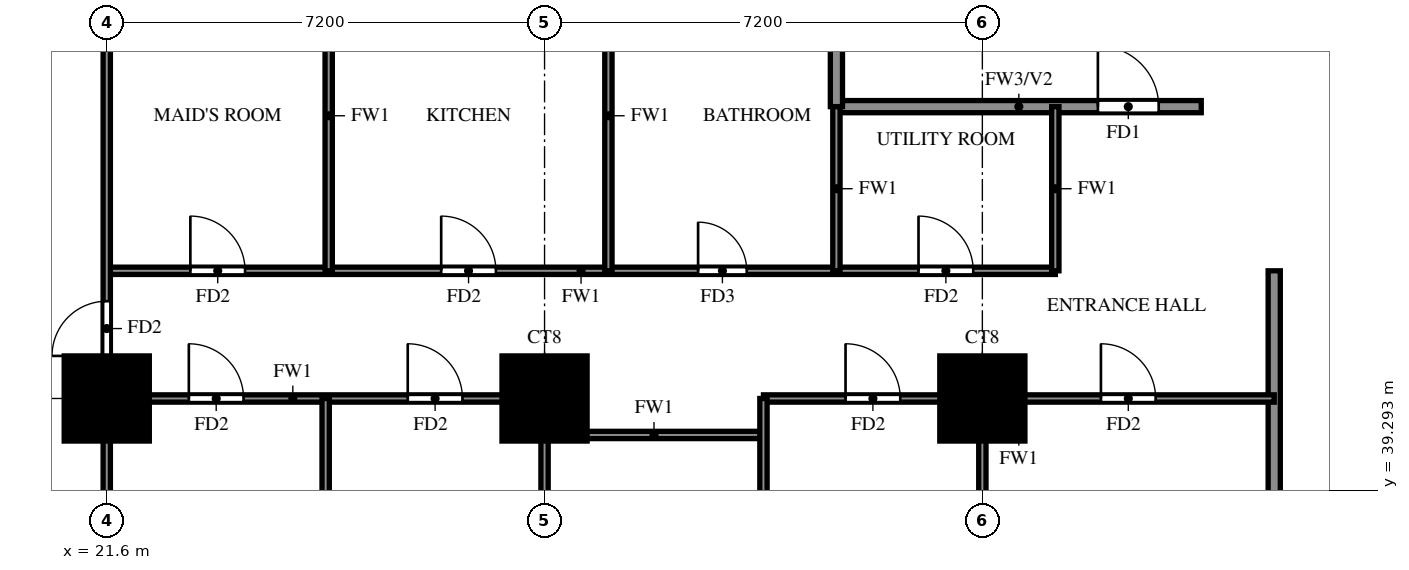
"""IFC4 building model, lengths in metres.
Left out: names, types, materials, properties, quantities, classifications, styles, units other than length and angle.
Written with IfcOpenShell. Run it as: python <this file> out.ifc"""

import sys

from ifc_helpers import new_model, si_unit, direction, frame, frame_2d, origin, origin_2d, place, context, subcontext, project, spatial, rectangle, extrude, source, transform, mapped, element, fill, save


model = new_model("IFC4")
c1 = context("Model", 3, precision=1e-05, world=origin(), true_north=direction((0.0, 1.0)))
c2 = subcontext(c1, "Body", "Model", "MODEL_VIEW")
j1 = project(units=[si_unit("LENGTHUNIT", "METRE"), si_unit("PLANEANGLEUNIT", "RADIAN")], contexts=[c1])
p1 = place(None, origin())
s1 = spatial("IfcSite", under=j1, at=p1, CompositionType="ELEMENT")
p2 = place(p1, origin())
s2 = spatial("IfcBuilding", under=s1, at=p2, CompositionType="ELEMENT")
p3 = place(p2, frame((0.0, 0.0, 34.0)))
s3 = spatial("IfcBuildingStorey", under=s2, at=p3, CompositionType="ELEMENT", Elevation=34.0)
m1 = source(origin(), c2, "Body", "SweptSolid", [
    extrude(rectangle(XDim=1.4, YDim=1.4, at=origin_2d()), origin(), (0.0, 0.0, 1.0), 3.18),
])
for number, where, z_axis, x_axis in (
    (1, (21.6, 40.8, 0.0), (0.0, 0.0, 1.0), (1.0, 0.0, 0.0)),
    (2, (28.8, 40.8, 0.0), (0.0, 0.0, 1.0), (1.0, 0.0, 0.0)),
    (3, (36.0, 40.8, 0.0), (0.0, 0.0, 1.0), (1.0, 0.0, 0.0)),
):
    element("IfcColumn", number, at=place(p3, frame(where, z_axis=z_axis, x_axis=x_axis)), inside=s3, PredefinedType="COLUMN", context=c2, shape_type="MappedRepresentation", body=[
        mapped(m1, transform((0.0, 0.0, 0.0))),
    ])
p4 = place(p3, frame((33.6, 45.6, 0.0), z_axis=(0.0, 0.0, 1.0), x_axis=(1.0, 0.0, 0.0)))
e4 = element("IfcWall", 4, at=p4, inside=s3, PredefinedType="SOLIDWALL", context=c2, shape_type="SweptSolid", body=[
    extrude(rectangle(XDim=6.0, YDim=0.2, at=frame_2d((3.0, 0.0))), origin(), (0.0, 0.0, 1.0), 3.18),
])
p5 = place(p4, frame((4.3, 0.0, 0.0)))
e5 = element("IfcOpeningElement", 5, at=p5, cuts=e4, PredefinedType="OPENING", context=c2, shape_type="SweptSolid", body=[
    extrude(rectangle(XDim=1.0, YDim=2.1, at=frame_2d((0.5, 1.05))), frame((0.0, 0.11, 0.0), z_axis=(0.0, -1.0, 0.0), x_axis=(1.0, 0.0, 0.0)), (0.0, 0.0, 1.0), 0.22),
])
p6 = place(p3, frame((33.6, 45.6, 0.0), z_axis=(0.0, 0.0, 1.0), x_axis=(0.0, 1.0, 0.0)))
e6 = element("IfcWall", 6, at=p6, inside=s3, PredefinedType="SOLIDWALL", context=c2, shape_type="SweptSolid", body=[
    extrude(rectangle(XDim=14.4, YDim=0.2, at=frame_2d((7.2, 0.0))), origin(), (0.0, 0.0, 1.0), 3.18),
])
p7 = place(p3, frame((40.8, 33.725, 0.0), z_axis=(0.0, 0.0, 1.0), x_axis=(0.0, 1.0, 0.0)))
e7 = element("IfcWall", 7, at=p7, inside=s3, PredefinedType="SOLIDWALL", context=c2, shape_type="SweptSolid", body=[
    extrude(rectangle(XDim=9.175, YDim=0.2, at=frame_2d((4.587, 0.0))), origin(), (0.0, 0.0, 1.0), 2.28),
])
p8 = place(p3, frame((28.8, 40.2, 0.0), z_axis=(0.0, 0.0, 1.0), x_axis=(1.0, 0.0, 0.0)))
e8 = element("IfcWall", 8, at=p8, inside=s3, PredefinedType="PARTITIONING", context=c2, shape_type="SweptSolid", body=[
    extrude(rectangle(XDim=3.6, YDim=0.12, at=frame_2d((1.8, 0.0))), origin(), (0.0, 0.0, 1.0), 3.18),
])
p9 = place(p3, frame((21.6, 40.8, 0.0), z_axis=(0.0, 0.0, 1.0), x_axis=(1.0, 0.0, 0.0)))
e9 = element("IfcWall", 9, at=p9, inside=s3, PredefinedType="PARTITIONING", context=c2, shape_type="SweptSolid", body=[
    extrude(rectangle(XDim=7.2, YDim=0.12, at=frame_2d((3.6, 0.0))), origin(), (0.0, 0.0, 1.0), 3.18),
])
p10 = place(p9, frame((1.35, 0.0, 0.0)))
e10 = element("IfcOpeningElement", 10, at=p10, cuts=e9, PredefinedType="OPENING", context=c2, shape_type="SweptSolid", body=[
    extrude(rectangle(XDim=0.9, YDim=2.1, at=frame_2d((0.45, 1.05))), frame((0.0, 0.07, 0.0), z_axis=(0.0, -1.0, 0.0), x_axis=(1.0, 0.0, 0.0)), (0.0, 0.0, 1.0), 0.14),
])
p11 = place(p9, frame((4.95, 0.0, 0.0)))
e11 = element("IfcOpeningElement", 11, at=p11, cuts=e9, PredefinedType="OPENING", context=c2, shape_type="SweptSolid", body=[
    extrude(rectangle(XDim=0.9, YDim=2.1, at=frame_2d((0.45, 1.05))), frame((0.0, 0.07, 0.0), z_axis=(0.0, -1.0, 0.0), x_axis=(1.0, 0.0, 0.0)), (0.0, 0.0, 1.0), 0.14),
])
p12 = place(p3, frame((32.4, 40.8, 0.0), z_axis=(0.0, 0.0, 1.0), x_axis=(1.0, 0.0, 0.0)))
e12 = element("IfcWall", 12, at=p12, inside=s3, PredefinedType="PARTITIONING", context=c2, shape_type="SweptSolid", body=[
    extrude(rectangle(XDim=8.4, YDim=0.12, at=frame_2d((4.2, 0.0))), origin(), (0.0, 0.0, 1.0), 3.18),
])
p13 = place(p12, frame((1.35, 0.0, 0.0)))
e13 = element("IfcOpeningElement", 13, at=p13, cuts=e12, PredefinedType="OPENING", context=c2, shape_type="SweptSolid", body=[
    extrude(rectangle(XDim=0.9, YDim=2.1, at=frame_2d((0.45, 1.05))), frame((0.0, 0.07, 0.0), z_axis=(0.0, -1.0, 0.0), x_axis=(1.0, 0.0, 0.0)), (0.0, 0.0, 1.0), 0.14),
])
p14 = place(p12, frame((5.55, 0.0, 0.0)))
e14 = element("IfcOpeningElement", 14, at=p14, cuts=e12, PredefinedType="OPENING", context=c2, shape_type="SweptSolid", body=[
    extrude(rectangle(XDim=0.9, YDim=2.1, at=frame_2d((0.45, 1.05))), frame((0.0, 0.07, 0.0), z_axis=(0.0, -1.0, 0.0), x_axis=(1.0, 0.0, 0.0)), (0.0, 0.0, 1.0), 0.14),
])
p15 = place(p3, frame((21.6, 42.9, 0.0), z_axis=(0.0, 0.0, 1.0), x_axis=(1.0, 0.0, 0.0)))
e15 = element("IfcWall", 15, at=p15, inside=s3, PredefinedType="PARTITIONING", context=c2, shape_type="SweptSolid", body=[
    extrude(rectangle(XDim=15.6, YDim=0.12, at=frame_2d((7.8, 0.0))), origin(), (0.0, 0.0, 1.0), 3.18),
])
p16 = place(p15, frame((1.375, 0.0, 0.0)))
e16 = element("IfcOpeningElement", 16, at=p16, cuts=e15, PredefinedType="OPENING", context=c2, shape_type="SweptSolid", body=[
    extrude(rectangle(XDim=0.9, YDim=2.1, at=frame_2d((0.45, 1.05))), frame((0.0, 0.07, 0.0), z_axis=(0.0, -1.0, 0.0), x_axis=(1.0, 0.0, 0.0)), (0.0, 0.0, 1.0), 0.14),
])
p17 = place(p15, frame((5.5, 0.0, 0.0)))
e17 = element("IfcOpeningElement", 17, at=p17, cuts=e15, PredefinedType="OPENING", context=c2, shape_type="SweptSolid", body=[
    extrude(rectangle(XDim=0.9, YDim=2.1, at=frame_2d((0.45, 1.05))), frame((0.0, 0.07, 0.0), z_axis=(0.0, -1.0, 0.0), x_axis=(1.0, 0.0, 0.0)), (0.0, 0.0, 1.0), 0.14),
])
p18 = place(p15, frame((9.725, 0.0, 0.0)))
e18 = element("IfcOpeningElement", 18, at=p18, cuts=e15, PredefinedType="OPENING", context=c2, shape_type="SweptSolid", body=[
    extrude(rectangle(XDim=0.8, YDim=2.1, at=frame_2d((0.4, 1.05))), frame((0.0, 0.07, 0.0), z_axis=(0.0, -1.0, 0.0), x_axis=(1.0, 0.0, 0.0)), (0.0, 0.0, 1.0), 0.14),
])
p19 = place(p15, frame((13.35, 0.0, 0.0)))
e19 = element("IfcOpeningElement", 19, at=p19, cuts=e15, PredefinedType="OPENING", context=c2, shape_type="SweptSolid", body=[
    extrude(rectangle(XDim=0.9, YDim=2.1, at=frame_2d((0.45, 1.05))), frame((0.0, 0.07, 0.0), z_axis=(0.0, -1.0, 0.0), x_axis=(1.0, 0.0, 0.0)), (0.0, 0.0, 1.0), 0.14),
])
p20 = place(p3, frame((21.6, 33.725, 0.0), z_axis=(0.0, 0.0, 1.0), x_axis=(0.0, 1.0, 0.0)))
e20 = element("IfcWall", 20, at=p20, inside=s3, PredefinedType="PARTITIONING", context=c2, shape_type="SweptSolid", body=[
    extrude(rectangle(XDim=35.875, YDim=0.12, at=frame_2d((17.938, 0.0))), origin(), (0.0, 0.0, 1.0), 3.18),
])
p21 = place(p20, frame((7.775, 0.0, 0.0)))
e21 = element("IfcOpeningElement", 21, at=p21, cuts=e20, PredefinedType="OPENING", context=c2, shape_type="SweptSolid", body=[
    extrude(rectangle(XDim=0.9, YDim=2.1, at=frame_2d((0.45, 1.05))), frame((0.0, 0.07, 0.0), z_axis=(0.0, -1.0, 0.0), x_axis=(1.0, 0.0, 0.0)), (0.0, 0.0, 1.0), 0.14),
])
p22 = place(p20, frame((15.625, 0.0, 0.0)))
e22 = element("IfcOpeningElement", 22, at=p22, cuts=e20, PredefinedType="OPENING", context=c2, shape_type="SweptSolid", body=[
    extrude(rectangle(XDim=0.9, YDim=2.1, at=frame_2d((0.45, 1.05))), frame((0.0, 0.07, 0.0), z_axis=(0.0, -1.0, 0.0), x_axis=(1.0, 0.0, 0.0)), (0.0, 0.0, 1.0), 0.14),
])
p23 = place(p20, frame((22.225, 0.0, 0.0)))
e23 = element("IfcOpeningElement", 23, at=p23, cuts=e20, PredefinedType="OPENING", context=c2, shape_type="SweptSolid", body=[
    extrude(rectangle(XDim=1.5, YDim=2.1, at=frame_2d((0.75, 1.05))), frame((0.0, 0.07, 0.0), z_axis=(0.0, -1.0, 0.0), x_axis=(1.0, 0.0, 0.0)), (0.0, 0.0, 1.0), 0.14),
])
p24 = place(p20, frame((26.425, 0.0, 0.0)))
e24 = element("IfcOpeningElement", 24, at=p24, cuts=e20, PredefinedType="OPENING", context=c2, shape_type="SweptSolid", body=[
    extrude(rectangle(XDim=0.9, YDim=2.1, at=frame_2d((0.45, 1.05))), frame((0.0, 0.07, 0.0), z_axis=(0.0, -1.0, 0.0), x_axis=(1.0, 0.0, 0.0)), (0.0, 0.0, 1.0), 0.14),
])
p25 = place(p20, frame((30.025, 0.0, 0.0)))
e25 = element("IfcOpeningElement", 25, at=p25, cuts=e20, PredefinedType="OPENING", context=c2, shape_type="SweptSolid", body=[
    extrude(rectangle(XDim=0.9, YDim=2.1, at=frame_2d((0.45, 1.05))), frame((0.0, 0.07, 0.0), z_axis=(0.0, -1.0, 0.0), x_axis=(1.0, 0.0, 0.0)), (0.0, 0.0, 1.0), 0.14),
])
p26 = place(p20, frame((33.625, 0.0, 0.0)))
e26 = element("IfcOpeningElement", 26, at=p26, cuts=e20, PredefinedType="OPENING", context=c2, shape_type="SweptSolid", body=[
    extrude(rectangle(XDim=0.9, YDim=2.1, at=frame_2d((0.45, 1.05))), frame((0.0, 0.07, 0.0), z_axis=(0.0, -1.0, 0.0), x_axis=(1.0, 0.0, 0.0)), (0.0, 0.0, 1.0), 0.14),
])
p27 = place(p3, frame((25.2, 33.725, 0.0), z_axis=(0.0, 0.0, 1.0), x_axis=(0.0, 1.0, 0.0)))
e27 = element("IfcWall", 27, at=p27, inside=s3, PredefinedType="PARTITIONING", context=c2, shape_type="SweptSolid", body=[
    extrude(rectangle(XDim=7.075, YDim=0.12, at=frame_2d((3.538, 0.0))), origin(), (0.0, 0.0, 1.0), 2.28),
])
p28 = place(p3, frame((25.25, 42.9, 0.0), z_axis=(0.0, 0.0, 1.0), x_axis=(0.0, 1.0, 0.0)))
e28 = element("IfcWall", 28, at=p28, inside=s3, PredefinedType="PARTITIONING", context=c2, shape_type="SweptSolid", body=[
    extrude(rectangle(XDim=5.1, YDim=0.12, at=frame_2d((2.55, 0.0))), origin(), (0.0, 0.0, 1.0), 3.18),
])
p29 = place(p3, frame((28.8, 33.725, 0.0), z_axis=(0.0, 0.0, 1.0), x_axis=(0.0, 1.0, 0.0)))
e29 = element("IfcWall", 29, at=p29, inside=s3, PredefinedType="PARTITIONING", context=c2, shape_type="SweptSolid", body=[
    extrude(rectangle(XDim=7.075, YDim=0.12, at=frame_2d((3.538, 0.0))), origin(), (0.0, 0.0, 1.0), 3.18),
])
p30 = place(p29, frame((2.837, 0.0, 0.0)))
e30 = element("IfcOpeningElement", 30, at=p30, cuts=e29, PredefinedType="OPENING", context=c2, shape_type="SweptSolid", body=[
    extrude(rectangle(XDim=0.8, YDim=2.1, at=frame_2d((0.4, 1.05))), frame((0.0, 0.07, 0.0), z_axis=(0.0, -1.0, 0.0), x_axis=(1.0, 0.0, 0.0)), (0.0, 0.0, 1.0), 0.14),
])
p31 = place(p3, frame((29.85, 42.9, 0.0), z_axis=(0.0, 0.0, 1.0), x_axis=(0.0, 1.0, 0.0)))
e31 = element("IfcWall", 31, at=p31, inside=s3, PredefinedType="PARTITIONING", context=c2, shape_type="SweptSolid", body=[
    extrude(rectangle(XDim=5.1, YDim=0.12, at=frame_2d((2.55, 0.0))), origin(), (0.0, 0.0, 1.0), 3.18),
])
p32 = place(p3, frame((32.4, 33.725, 0.0), z_axis=(0.0, 0.0, 1.0), x_axis=(0.0, 1.0, 0.0)))
e32 = element("IfcWall", 32, at=p32, inside=s3, PredefinedType="PARTITIONING", context=c2, shape_type="SweptSolid", body=[
    extrude(rectangle(XDim=7.075, YDim=0.12, at=frame_2d((3.538, 0.0))), origin(), (0.0, 0.0, 1.0), 2.28),
])
p33 = place(p3, frame((33.6, 42.9, 0.0), z_axis=(0.0, 0.0, 1.0), x_axis=(0.0, 1.0, 0.0)))
e33 = element("IfcWall", 33, at=p33, inside=s3, PredefinedType="PARTITIONING", context=c2, shape_type="SweptSolid", body=[
    extrude(rectangle(XDim=2.7, YDim=0.12, at=frame_2d((1.35, 0.0))), origin(), (0.0, 0.0, 1.0), 3.18),
])
p34 = place(p3, frame((36.0, 33.725, 0.0), z_axis=(0.0, 0.0, 1.0), x_axis=(0.0, 1.0, 0.0)))
e34 = element("IfcWall", 34, at=p34, inside=s3, PredefinedType="PARTITIONING", context=c2, shape_type="SweptSolid", body=[
    extrude(rectangle(XDim=7.075, YDim=0.12, at=frame_2d((3.538, 0.0))), origin(), (0.0, 0.0, 1.0), 3.18),
])
p35 = place(p3, frame((37.2, 42.9, 0.0), z_axis=(0.0, 0.0, 1.0), x_axis=(0.0, 1.0, 0.0)))
e35 = element("IfcWall", 35, at=p35, inside=s3, PredefinedType="PARTITIONING", context=c2, shape_type="SweptSolid", body=[
    extrude(rectangle(XDim=2.7, YDim=0.12, at=frame_2d((1.35, 0.0))), origin(), (0.0, 0.0, 1.0), 3.18),
])
p36 = place(p5, origin())
e36 = element("IfcDoor", 36, at=p36, inside=s3, OperationType="SINGLE_SWING_LEFT", PredefinedType="DOOR", context=c2, shape_type="SweptSolid", body=[
    extrude(rectangle(XDim=1.0, YDim=2.1, at=frame_2d((0.5, 1.05))), frame((0.0, 0.025, 0.0), z_axis=(0.0, -1.0, 0.0), x_axis=(1.0, 0.0, 0.0)), (0.0, 0.0, 1.0), 0.05),
])
fill(e5, e36)
p37 = place(p21, origin())
e37 = element("IfcDoor", 37, at=p37, inside=s3, OperationType="SINGLE_SWING_RIGHT", PredefinedType="DOOR", context=c2, shape_type="SweptSolid", body=[
    extrude(rectangle(XDim=0.9, YDim=2.1, at=frame_2d((0.45, 1.05))), frame((0.0, 0.025, 0.0), z_axis=(0.0, -1.0, 0.0), x_axis=(1.0, 0.0, 0.0)), (0.0, 0.0, 1.0), 0.05),
])
fill(e21, e37)
p38 = place(p10, origin())
e38 = element("IfcDoor", 38, at=p38, inside=s3, OperationType="SINGLE_SWING_RIGHT", PredefinedType="DOOR", context=c2, shape_type="SweptSolid", body=[
    extrude(rectangle(XDim=0.9, YDim=2.1, at=frame_2d((0.45, 1.05))), frame((0.0, 0.025, 0.0), z_axis=(0.0, -1.0, 0.0), x_axis=(1.0, 0.0, 0.0)), (0.0, 0.0, 1.0), 0.05),
])
fill(e10, e38)
p39 = place(p11, origin())
e39 = element("IfcDoor", 39, at=p39, inside=s3, OperationType="SINGLE_SWING_LEFT", PredefinedType="DOOR", context=c2, shape_type="SweptSolid", body=[
    extrude(rectangle(XDim=0.9, YDim=2.1, at=frame_2d((0.45, 1.05))), frame((0.0, 0.025, 0.0), z_axis=(0.0, -1.0, 0.0), x_axis=(1.0, 0.0, 0.0)), (0.0, 0.0, 1.0), 0.05),
])
fill(e11, e39)
p40 = place(p13, origin())
e40 = element("IfcDoor", 40, at=p40, inside=s3, OperationType="SINGLE_SWING_RIGHT", PredefinedType="DOOR", context=c2, shape_type="SweptSolid", body=[
    extrude(rectangle(XDim=0.9, YDim=2.1, at=frame_2d((0.45, 1.05))), frame((0.0, 0.025, 0.0), z_axis=(0.0, -1.0, 0.0), x_axis=(1.0, 0.0, 0.0)), (0.0, 0.0, 1.0), 0.05),
])
fill(e13, e40)
p41 = place(p14, origin())
e41 = element("IfcDoor", 41, at=p41, inside=s3, OperationType="SINGLE_SWING_LEFT", PredefinedType="DOOR", context=c2, shape_type="SweptSolid", body=[
    extrude(rectangle(XDim=0.9, YDim=2.1, at=frame_2d((0.45, 1.05))), frame((0.0, 0.025, 0.0), z_axis=(0.0, -1.0, 0.0), x_axis=(1.0, 0.0, 0.0)), (0.0, 0.0, 1.0), 0.05),
])
fill(e14, e41)
p42 = place(p16, origin())
e42 = element("IfcDoor", 42, at=p42, inside=s3, OperationType="SINGLE_SWING_LEFT", PredefinedType="DOOR", context=c2, shape_type="SweptSolid", body=[
    extrude(rectangle(XDim=0.9, YDim=2.1, at=frame_2d((0.45, 1.05))), frame((0.0, 0.025, 0.0), z_axis=(0.0, -1.0, 0.0), x_axis=(1.0, 0.0, 0.0)), (0.0, 0.0, 1.0), 0.05),
])
fill(e16, e42)
p43 = place(p17, origin())
e43 = element("IfcDoor", 43, at=p43, inside=s3, OperationType="SINGLE_SWING_RIGHT", PredefinedType="DOOR", context=c2, shape_type="SweptSolid", body=[
    extrude(rectangle(XDim=0.9, YDim=2.1, at=frame_2d((0.45, 1.05))), frame((0.0, 0.025, 0.0), z_axis=(0.0, -1.0, 0.0), x_axis=(1.0, 0.0, 0.0)), (0.0, 0.0, 1.0), 0.05),
])
fill(e17, e43)
p44 = place(p18, origin())
e44 = element("IfcDoor", 44, at=p44, inside=s3, OperationType="SINGLE_SWING_LEFT", PredefinedType="DOOR", context=c2, shape_type="SweptSolid", body=[
    extrude(rectangle(XDim=0.8, YDim=2.1, at=frame_2d((0.4, 1.05))), frame((0.0, 0.025, 0.0), z_axis=(0.0, -1.0, 0.0), x_axis=(1.0, 0.0, 0.0)), (0.0, 0.0, 1.0), 0.05),
])
fill(e18, e44)
p45 = place(p19, origin())
e45 = element("IfcDoor", 45, at=p45, inside=s3, OperationType="SINGLE_SWING_LEFT", PredefinedType="DOOR", context=c2, shape_type="SweptSolid", body=[
    extrude(rectangle(XDim=0.9, YDim=2.1, at=frame_2d((0.45, 1.05))), frame((0.0, 0.025, 0.0), z_axis=(0.0, -1.0, 0.0), x_axis=(1.0, 0.0, 0.0)), (0.0, 0.0, 1.0), 0.05),
])
fill(e19, e45)
save(model, sys.argv[1])
